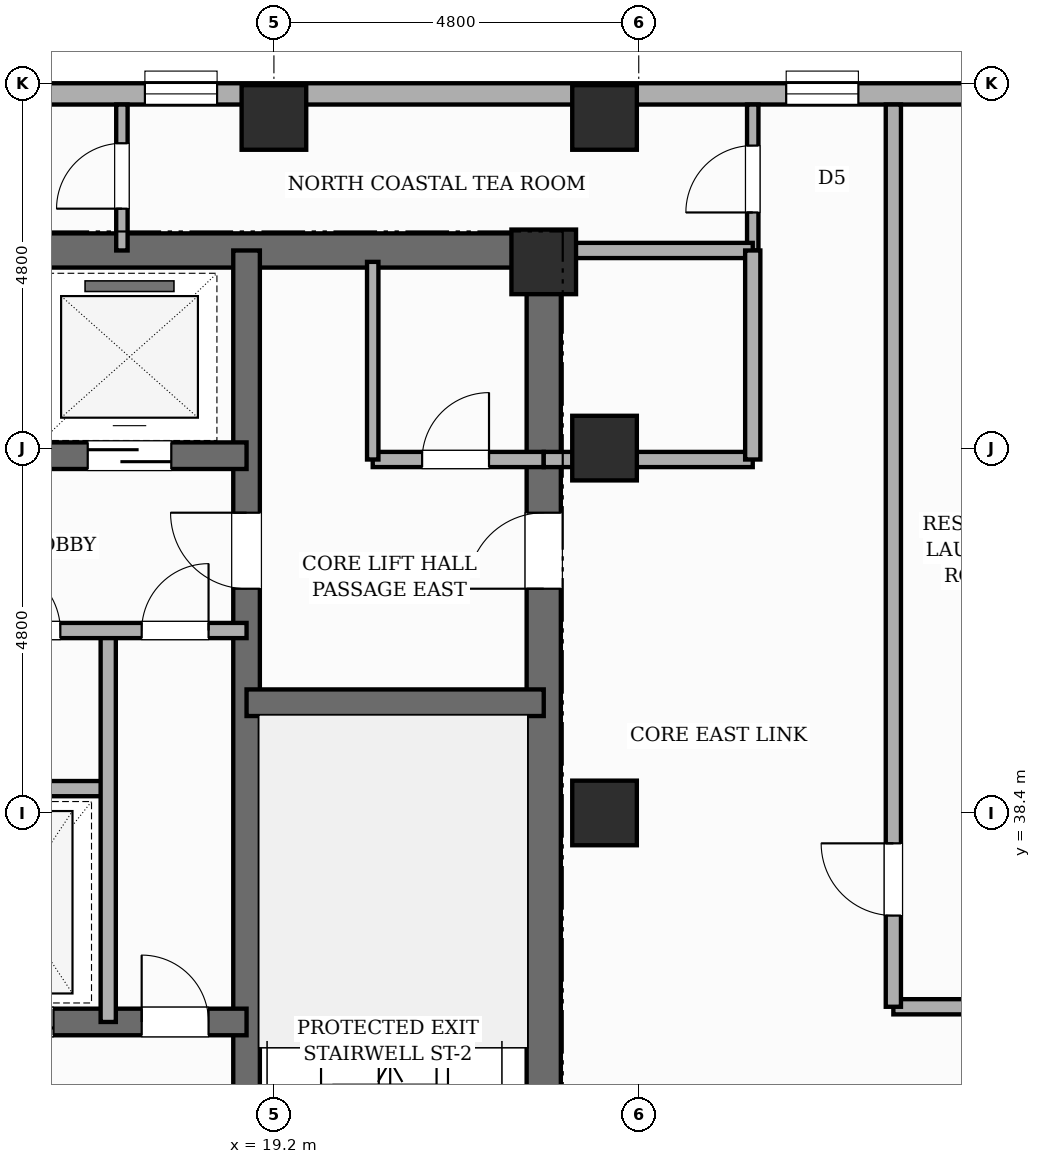
"""IFC4 building model, lengths in metres.
Left out: names, types, materials, properties, quantities, classifications, styles, units other than length and angle.
Written with IfcOpenShell. Run it as: python <this file> out.ifc"""

import sys

from ifc_helpers import new_model, si_unit, direction, frame, frame_2d, origin, origin_2d, place, context, subcontext, project, spatial, rectangle, extrude, element, fill, save


model = new_model("IFC4")
c1 = context("Model", 3, precision=1e-05, world=origin(), true_north=direction((0.0, 1.0)))
c2 = subcontext(c1, "Body", "Model", "MODEL_VIEW")
j1 = project(units=[si_unit("LENGTHUNIT", "METRE"), si_unit("PLANEANGLEUNIT", "RADIAN")], contexts=[c1])
p1 = place(None, origin())
s1 = spatial("IfcSite", under=j1, at=p1, CompositionType="ELEMENT")
p2 = place(p1, origin())
s2 = spatial("IfcBuilding", under=s1, at=p2, CompositionType="ELEMENT")
p3 = place(p2, frame((0.0, 0.0, 211.0)))
s3 = spatial("IfcBuildingStorey", under=s2, at=p3, CompositionType="ELEMENT", Elevation=211.0)
p4 = place(p3, frame((22.75, 30.675, 0.0), z_axis=(0.0, 0.0, 1.0), x_axis=(0.0, 1.0, 0.0)))
e1 = element("IfcWall", 1, at=p4, inside=s3, PredefinedType="SHEAR", context=c2, shape_type="SweptSolid", body=[
    extrude(rectangle(XDim=15.35, YDim=0.45, at=frame_2d((7.675, 0.0))), origin(), (0.0, 0.0, 1.0), 3.6),
])
p5 = place(p4, frame((10.675, 0.0, 0.0)))
e2 = element("IfcOpeningElement", 2, at=p5, cuts=e1, PredefinedType="OPENING", context=c2, shape_type="SweptSolid", body=[
    extrude(rectangle(XDim=1.0, YDim=2.15, at=frame_2d((0.5, 1.075))), frame((0.0, 0.235, 0.0), z_axis=(0.0, -1.0, 0.0), x_axis=(1.0, 0.0, 0.0)), (0.0, 0.0, 1.0), 0.47),
])
p6 = place(p3, frame((6.05, 45.8, 0.0), z_axis=(0.0, 0.0, 1.0), x_axis=(1.0, 0.0, 0.0)))
e3 = element("IfcWall", 3, at=p6, inside=s3, PredefinedType="SHEAR", context=c2, shape_type="SweptSolid", body=[
    extrude(rectangle(XDim=16.7, YDim=0.45, at=frame_2d((8.35, 0.0))), origin(), (0.0, 0.0, 1.0), 3.6),
])
p7 = place(p3, frame((18.84, 30.9, 0.0), z_axis=(0.0, 0.0, 1.0), x_axis=(0.0, 1.0, 0.0)))
e4 = element("IfcWall", 4, at=p7, inside=s3, PredefinedType="SHEAR", context=c2, shape_type="SweptSolid", body=[
    extrude(rectangle(XDim=14.9, YDim=0.35, at=frame_2d((7.45, 0.0))), origin(), (0.0, 0.0, 1.0), 3.6),
])
p8 = place(p7, frame((0.65, 0.0, 0.0)))
e5 = element("IfcOpeningElement", 5, at=p8, cuts=e4, PredefinedType="OPENING", context=c2, shape_type="SweptSolid", body=[
    extrude(rectangle(XDim=0.95, YDim=2.1, at=frame_2d((0.475, 1.05))), frame((0.0, 0.185, 0.0), z_axis=(0.0, -1.0, 0.0), x_axis=(1.0, 0.0, 0.0)), (0.0, 0.0, 1.0), 0.37),
])
p9 = place(p7, frame((10.45, 0.0, 0.0)))
e6 = element("IfcOpeningElement", 6, at=p9, cuts=e4, PredefinedType="OPENING", context=c2, shape_type="SweptSolid", body=[
    extrude(rectangle(XDim=1.0, YDim=2.15, at=frame_2d((0.5, 1.075))), frame((0.0, 0.185, 0.0), z_axis=(0.0, -1.0, 0.0), x_axis=(1.0, 0.0, 0.0)), (0.0, 0.0, 1.0), 0.37),
])
p10 = place(p3, frame((18.84, 39.85, 0.0), z_axis=(0.0, 0.0, 1.0), x_axis=(1.0, 0.0, 0.0)))
e7 = element("IfcWall", 7, at=p10, inside=s3, PredefinedType="SHEAR", context=c2, shape_type="SweptSolid", body=[
    extrude(rectangle(XDim=3.91, YDim=0.35, at=frame_2d((1.955, 0.0))), origin(), (0.0, 0.0, 1.0), 3.6),
])
p11 = place(p3, frame((9.96, 35.65, 0.0), z_axis=(0.0, 0.0, 1.0), x_axis=(1.0, 0.0, 0.0)))
e8 = element("IfcWall", 8, at=p11, inside=s3, PredefinedType="SHEAR", context=c2, shape_type="SweptSolid", body=[
    extrude(rectangle(XDim=8.88, YDim=0.35, at=frame_2d((4.44, 0.0))), origin(), (0.0, 0.0, 1.0), 3.6),
])
p12 = place(p11, frame((0.84, 0.0, 0.0)))
e9 = element("IfcOpeningElement", 9, at=p12, cuts=e8, PredefinedType="OPENING", context=c2, shape_type="SweptSolid", body=[
    extrude(rectangle(XDim=1.1, YDim=2.15, at=frame_2d((0.55, 1.075))), frame((0.0, 0.185, 0.0), z_axis=(0.0, -1.0, 0.0), x_axis=(1.0, 0.0, 0.0)), (0.0, 0.0, 1.0), 0.37),
])
p13 = place(p11, frame((5.24, 0.0, 0.0)))
e10 = element("IfcOpeningElement", 10, at=p13, cuts=e8, PredefinedType="OPENING", context=c2, shape_type="SweptSolid", body=[
    extrude(rectangle(XDim=1.1, YDim=2.15, at=frame_2d((0.55, 1.075))), frame((0.0, 0.185, 0.0), z_axis=(0.0, -1.0, 0.0), x_axis=(1.0, 0.0, 0.0)), (0.0, 0.0, 1.0), 0.37),
])
p14 = place(p11, frame((7.5, 0.0, 0.0)))
e11 = element("IfcOpeningElement", 11, at=p14, cuts=e8, PredefinedType="OPENING", context=c2, shape_type="SweptSolid", body=[
    extrude(rectangle(XDim=0.88, YDim=2.1, at=frame_2d((0.44, 1.05))), frame((0.0, 0.185, 0.0), z_axis=(0.0, -1.0, 0.0), x_axis=(1.0, 0.0, 0.0)), (0.0, 0.0, 1.0), 0.37),
])
p15 = place(p3, frame((9.96, 43.1, 0.0), z_axis=(0.0, 0.0, 1.0), x_axis=(1.0, 0.0, 0.0)))
e12 = element("IfcWall", 12, at=p15, inside=s3, PredefinedType="SHEAR", context=c2, shape_type="SweptSolid", body=[
    extrude(rectangle(XDim=8.88, YDim=0.35, at=frame_2d((4.44, 0.0))), origin(), (0.0, 0.0, 1.0), 3.6),
])
p16 = place(p15, frame((0.99, 0.0, 0.0)))
e13 = element("IfcOpeningElement", 13, at=p16, cuts=e12, PredefinedType="OPENING", context=c2, shape_type="SweptSolid", body=[
    extrude(rectangle(XDim=1.1, YDim=2.15, at=frame_2d((0.55, 1.075))), frame((0.0, 0.185, 0.0), z_axis=(0.0, -1.0, 0.0), x_axis=(1.0, 0.0, 0.0)), (0.0, 0.0, 1.0), 0.37),
])
p17 = place(p15, frame((3.89, 0.0, 0.0)))
e14 = element("IfcOpeningElement", 14, at=p17, cuts=e12, PredefinedType="OPENING", context=c2, shape_type="SweptSolid", body=[
    extrude(rectangle(XDim=1.1, YDim=2.15, at=frame_2d((0.55, 1.075))), frame((0.0, 0.185, 0.0), z_axis=(0.0, -1.0, 0.0), x_axis=(1.0, 0.0, 0.0)), (0.0, 0.0, 1.0), 0.37),
])
p18 = place(p15, frame((6.79, 0.0, 0.0)))
e15 = element("IfcOpeningElement", 15, at=p18, cuts=e12, PredefinedType="OPENING", context=c2, shape_type="SweptSolid", body=[
    extrude(rectangle(XDim=1.1, YDim=2.15, at=frame_2d((0.55, 1.075))), frame((0.0, 0.185, 0.0), z_axis=(0.0, -1.0, 0.0), x_axis=(1.0, 0.0, 0.0)), (0.0, 0.0, 1.0), 0.37),
])
for number, where, z_axis, x_axis in (
    (16, (19.2, 47.55, 0.0), (0.0, 0.0, 1.0), (1.0, 0.0, 0.0)),
    (17, (22.75, 45.65, 0.0), (0.0, 0.0, 1.0), (1.0, 0.0, 0.0)),
    (18, (23.55, 38.4, 0.0), (0.0, 0.0, 1.0), (1.0, 0.0, 0.0)),
    (19, (23.55, 43.2, 0.0), (0.0, 0.0, 1.0), (1.0, 0.0, 0.0)),
    (20, (23.55, 47.55, 0.0), (0.0, 0.0, 1.0), (1.0, 0.0, 0.0)),
):
    element("IfcColumn", number, at=place(p3, frame(where, z_axis=z_axis, x_axis=x_axis)), inside=s3, PredefinedType="COLUMN", context=c2, shape_type="SweptSolid", body=[
        extrude(rectangle(XDim=0.85, YDim=0.85, at=origin_2d()), origin(), (0.0, 0.0, 1.0), 3.6),
    ])
p19 = place(p3, frame((7.2, 47.86, 0.0), z_axis=(0.0, 0.0, 1.0), x_axis=(1.0, 0.0, 0.0)))
e21 = element("IfcWall", 21, at=p19, inside=s3, PredefinedType="STANDARD", context=c2, shape_type="SweptSolid", body=[
    extrude(rectangle(XDim=43.2, YDim=0.28, at=frame_2d((21.6, 0.0))), origin(), (0.0, 0.0, 1.0), 2.66),
])
p20 = place(p19, frame((28.866, 0.0, 0.65)))
e22 = element("IfcOpeningElement", 22, at=p20, cuts=e21, PredefinedType="OPENING", context=c2, shape_type="SweptSolid", body=[
    extrude(rectangle(XDim=1.4, YDim=1.1, at=frame_2d((0.7, 0.55))), frame((0.0, 0.15, 0.0), z_axis=(0.0, -1.0, 0.0), x_axis=(1.0, 0.0, 0.0)), (0.0, 0.0, 1.0), 0.3),
])
p21 = place(p19, frame((41.49, 0.0, 0.65)))
e23 = element("IfcOpeningElement", 23, at=p21, cuts=e21, PredefinedType="OPENING", context=c2, shape_type="SweptSolid", body=[
    extrude(rectangle(XDim=1.4, YDim=1.1, at=frame_2d((0.7, 0.55))), frame((0.0, 0.15, 0.0), z_axis=(0.0, -1.0, 0.0), x_axis=(1.0, 0.0, 0.0)), (0.0, 0.0, 1.0), 0.3),
])
p22 = place(p19, frame((18.74, 0.0, 0.45)))
e24 = element("IfcOpeningElement", 24, at=p22, cuts=e21, PredefinedType="OPENING", context=c2, shape_type="SweptSolid", body=[
    extrude(rectangle(XDim=0.95, YDim=1.8, at=frame_2d((0.475, 0.9))), frame((0.0, 0.15, 0.0), z_axis=(0.0, -1.0, 0.0), x_axis=(1.0, 0.0, 0.0)), (0.0, 0.0, 1.0), 0.3),
])
p23 = place(p19, frame((37.887, 0.0, 0.65)))
e25 = element("IfcOpeningElement", 25, at=p23, cuts=e21, PredefinedType="OPENING", context=c2, shape_type="SweptSolid", body=[
    extrude(rectangle(XDim=1.4, YDim=1.1, at=frame_2d((0.7, 0.55))), frame((0.0, 0.15, 0.0), z_axis=(0.0, -1.0, 0.0), x_axis=(1.0, 0.0, 0.0)), (0.0, 0.0, 1.0), 0.3),
])
p24 = place(p19, frame((0.308, 0.0, 0.65)))
e26 = element("IfcOpeningElement", 26, at=p24, cuts=e21, PredefinedType="OPENING", context=c2, shape_type="SweptSolid", body=[
    extrude(rectangle(XDim=1.4, YDim=1.1, at=frame_2d((0.7, 0.55))), frame((0.0, 0.15, 0.0), z_axis=(0.0, -1.0, 0.0), x_axis=(1.0, 0.0, 0.0)), (0.0, 0.0, 1.0), 0.3),
])
p25 = place(p19, frame((10.302, 0.0, 0.45)))
e27 = element("IfcOpeningElement", 27, at=p25, cuts=e21, PredefinedType="OPENING", context=c2, shape_type="SweptSolid", body=[
    extrude(rectangle(XDim=0.95, YDim=1.8, at=frame_2d((0.475, 0.9))), frame((0.0, 0.15, 0.0), z_axis=(0.0, -1.0, 0.0), x_axis=(1.0, 0.0, 0.0)), (0.0, 0.0, 1.0), 0.3),
])
p26 = place(p19, frame((23.492, 0.0, 0.65)))
e28 = element("IfcOpeningElement", 28, at=p26, cuts=e21, PredefinedType="OPENING", context=c2, shape_type="SweptSolid", body=[
    extrude(rectangle(XDim=1.4, YDim=1.1, at=frame_2d((0.7, 0.55))), frame((0.0, 0.15, 0.0), z_axis=(0.0, -1.0, 0.0), x_axis=(1.0, 0.0, 0.0)), (0.0, 0.0, 1.0), 0.3),
])
p27 = place(p3, frame((9.96, 38.72, 0.0), z_axis=(0.0, 0.0, 1.0), x_axis=(1.0, 0.0, 0.0)))
e29 = element("IfcWall", 29, at=p27, inside=s3, PredefinedType="POLYGONAL", context=c2, shape_type="SweptSolid", body=[
    extrude(rectangle(XDim=7.06, YDim=0.2, at=frame_2d((3.53, 0.0))), origin(), (0.0, 0.0, 1.0), 3.38),
])
p28 = place(p3, frame((17.02, 35.65, 0.0), z_axis=(0.0, 0.0, 1.0), x_axis=(0.0, 1.0, 0.0)))
e30 = element("IfcWall", 30, at=p28, inside=s3, PredefinedType="POLYGONAL", context=c2, shape_type="SweptSolid", body=[
    extrude(rectangle(XDim=5.15, YDim=0.2, at=frame_2d((2.575, 0.0))), origin(), (0.0, 0.0, 1.0), 3.38),
])
p29 = place(p3, frame((9.96, 40.8, 0.0), z_axis=(0.0, 0.0, 1.0), x_axis=(1.0, 0.0, 0.0)))
e31 = element("IfcWall", 31, at=p29, inside=s3, PredefinedType="POLYGONAL", context=c2, shape_type="SweptSolid", body=[
    extrude(rectangle(XDim=8.88, YDim=0.2, at=frame_2d((4.44, 0.0))), origin(), (0.0, 0.0, 1.0), 3.38),
])
p30 = place(p29, frame((7.5, 0.0, 0.0)))
e32 = element("IfcOpeningElement", 32, at=p30, cuts=e31, PredefinedType="OPENING", context=c2, shape_type="SweptSolid", body=[
    extrude(rectangle(XDim=0.88, YDim=2.1, at=frame_2d((0.44, 1.05))), frame((0.0, 0.11, 0.0), z_axis=(0.0, -1.0, 0.0), x_axis=(1.0, 0.0, 0.0)), (0.0, 0.0, 1.0), 0.22),
])
p31 = place(p29, frame((1.0, 0.0, 0.0)))
e33 = element("IfcOpeningElement", 33, at=p31, cuts=e31, PredefinedType="OPENING", context=c2, shape_type="SweptSolid", body=[
    extrude(rectangle(XDim=0.88, YDim=2.1, at=frame_2d((0.44, 1.05))), frame((0.0, 0.11, 0.0), z_axis=(0.0, -1.0, 0.0), x_axis=(1.0, 0.0, 0.0)), (0.0, 0.0, 1.0), 0.22),
])
p32 = place(p29, frame((3.4, 0.0, 0.0)))
e34 = element("IfcOpeningElement", 34, at=p32, cuts=e31, PredefinedType="OPENING", context=c2, shape_type="SweptSolid", body=[
    extrude(rectangle(XDim=0.88, YDim=2.1, at=frame_2d((0.44, 1.05))), frame((0.0, 0.11, 0.0), z_axis=(0.0, -1.0, 0.0), x_axis=(1.0, 0.0, 0.0)), (0.0, 0.0, 1.0), 0.22),
])
p33 = place(p29, frame((5.55, 0.0, 0.0)))
e35 = element("IfcOpeningElement", 35, at=p33, cuts=e31, PredefinedType="OPENING", context=c2, shape_type="SweptSolid", body=[
    extrude(rectangle(XDim=0.88, YDim=2.1, at=frame_2d((0.44, 1.05))), frame((0.0, 0.11, 0.0), z_axis=(0.0, -1.0, 0.0), x_axis=(1.0, 0.0, 0.0)), (0.0, 0.0, 1.0), 0.22),
])
p34 = place(p3, frame((20.5, 43.05, 0.0), z_axis=(0.0, 0.0, 1.0), x_axis=(1.0, 0.0, 0.0)))
e36 = element("IfcWall", 36, at=p34, inside=s3, PredefinedType="POLYGONAL", context=c2, shape_type="SweptSolid", body=[
    extrude(rectangle(XDim=2.25, YDim=0.2, at=frame_2d((1.125, 0.0))), origin(), (0.0, 0.0, 1.0), 2.66),
])
p35 = place(p34, frame((0.65, 0.0, 0.0)))
e37 = element("IfcOpeningElement", 37, at=p35, cuts=e36, PredefinedType="OPENING", context=c2, shape_type="SweptSolid", body=[
    extrude(rectangle(XDim=0.88, YDim=2.1, at=frame_2d((0.44, 1.05))), frame((0.0, 0.11, 0.0), z_axis=(0.0, -1.0, 0.0), x_axis=(1.0, 0.0, 0.0)), (0.0, 0.0, 1.0), 0.22),
])
p36 = place(p3, frame((20.5, 43.05, 0.0), z_axis=(0.0, 0.0, 1.0), x_axis=(0.0, 1.0, 0.0)))
e38 = element("IfcWall", 38, at=p36, inside=s3, PredefinedType="PARTITIONING", context=c2, shape_type="SweptSolid", body=[
    extrude(rectangle(XDim=2.6, YDim=0.15, at=frame_2d((1.3, 0.0))), origin(), (0.0, 0.0, 1.0), 3.38),
])
p37 = place(p3, frame((25.5, 45.8, 0.0), z_axis=(0.0, 0.0, 1.0), x_axis=(0.0, 1.0, 0.0)))
e39 = element("IfcWall", 39, at=p37, inside=s3, PredefinedType="PARTITIONING", context=c2, shape_type="SweptSolid", body=[
    extrude(rectangle(XDim=1.92, YDim=0.15, at=frame_2d((0.96, 0.0))), origin(), (0.0, 0.0, 1.0), 3.38),
])
p38 = place(p37, frame((0.5, 0.0, 0.0)))
e40 = element("IfcOpeningElement", 40, at=p38, cuts=e39, PredefinedType="OPENING", context=c2, shape_type="SweptSolid", body=[
    extrude(rectangle(XDim=0.88, YDim=2.1, at=frame_2d((0.44, 1.05))), frame((0.0, 0.085, 0.0), z_axis=(0.0, -1.0, 0.0), x_axis=(1.0, 0.0, 0.0)), (0.0, 0.0, 1.0), 0.17),
])
p39 = place(p3, frame((22.75, 45.8, 0.0), z_axis=(0.0, 0.0, 1.0), x_axis=(1.0, 0.0, 0.0)))
e41 = element("IfcWall", 41, at=p39, inside=s3, PredefinedType="PARTITIONING", context=c2, shape_type="SweptSolid", body=[
    extrude(rectangle(XDim=2.75, YDim=0.2, at=frame_2d((1.375, 0.0))), origin(), (0.0, 0.0, 1.0), 3.38),
])
p40 = place(p3, frame((17.2, 45.8, 0.0), z_axis=(0.0, 0.0, 1.0), x_axis=(0.0, 1.0, 0.0)))
e42 = element("IfcWall", 42, at=p40, inside=s3, PredefinedType="PARTITIONING", context=c2, shape_type="SweptSolid", body=[
    extrude(rectangle(XDim=1.92, YDim=0.15, at=frame_2d((0.96, 0.0))), origin(), (0.0, 0.0, 1.0), 3.38),
])
p41 = place(p40, frame((0.55, 0.0, 0.0)))
e43 = element("IfcOpeningElement", 43, at=p41, cuts=e42, PredefinedType="OPENING", context=c2, shape_type="SweptSolid", body=[
    extrude(rectangle(XDim=0.86, YDim=2.1, at=frame_2d((0.43, 1.05))), frame((0.0, 0.085, 0.0), z_axis=(0.0, -1.0, 0.0), x_axis=(1.0, 0.0, 0.0)), (0.0, 0.0, 1.0), 0.17),
])
p42 = place(p3, frame((27.35, 35.85, 0.0), z_axis=(0.0, 0.0, 1.0), x_axis=(1.0, 0.0, 0.0)))
e44 = element("IfcWall", 44, at=p42, inside=s3, PredefinedType="PARTITIONING", context=c2, shape_type="SweptSolid", body=[
    extrude(rectangle(XDim=14.43, YDim=0.2, at=frame_2d((7.215, 0.0))), origin(), (0.0, 0.0, 1.0), 3.38),
])
p43 = place(p42, frame((4.803, 0.0, 0.0)))
e45 = element("IfcOpeningElement", 45, at=p43, cuts=e44, PredefinedType="OPENING", context=c2, shape_type="SweptSolid", body=[
    extrude(rectangle(XDim=0.98, YDim=2.18, at=frame_2d((0.49, 1.09))), frame((0.0, 0.11, 0.0), z_axis=(0.0, -1.0, 0.0), x_axis=(1.0, 0.0, 0.0)), (0.0, 0.0, 1.0), 0.22),
])
p44 = place(p3, frame((27.35, 35.85, 0.0), z_axis=(0.0, 0.0, 1.0), x_axis=(0.0, 1.0, 0.0)))
e46 = element("IfcWall", 46, at=p44, inside=s3, PredefinedType="PARTITIONING", context=c2, shape_type="SweptSolid", body=[
    extrude(rectangle(XDim=11.87, YDim=0.2, at=frame_2d((5.935, 0.0))), origin(), (0.0, 0.0, 1.0), 3.38),
])
p45 = place(p44, frame((1.2, 0.0, 0.0)))
e47 = element("IfcOpeningElement", 47, at=p45, cuts=e46, PredefinedType="OPENING", context=c2, shape_type="SweptSolid", body=[
    extrude(rectangle(XDim=0.95, YDim=2.15, at=frame_2d((0.475, 1.075))), frame((0.0, 0.11, 0.0), z_axis=(0.0, -1.0, 0.0), x_axis=(1.0, 0.0, 0.0)), (0.0, 0.0, 1.0), 0.22),
])
p46 = place(p3, frame((22.75, 43.05, 0.0), z_axis=(0.0, 0.0, 1.0), x_axis=(1.0, 0.0, 0.0)))
e48 = element("IfcWall", 48, at=p46, inside=s3, PredefinedType="PARTITIONING", context=c2, shape_type="SweptSolid", body=[
    extrude(rectangle(XDim=2.75, YDim=0.2, at=frame_2d((1.375, 0.0))), origin(), (0.0, 0.0, 1.0), 2.66),
])
p47 = place(p3, frame((25.5, 43.05, 0.0), z_axis=(0.0, 0.0, 1.0), x_axis=(0.0, 1.0, 0.0)))
e49 = element("IfcWall", 49, at=p47, inside=s3, PredefinedType="PARTITIONING", context=c2, shape_type="SweptSolid", body=[
    extrude(rectangle(XDim=2.75, YDim=0.2, at=frame_2d((1.375, 0.0))), origin(), (0.0, 0.0, 1.0), 3.38),
])
p48 = place(p22, origin())
e50 = element("IfcWindow", 50, at=p48, inside=s3, PartitioningType="SINGLE_PANEL", PredefinedType="WINDOW", context=c2, shape_type="SweptSolid", body=[
    extrude(rectangle(XDim=0.95, YDim=1.8, at=frame_2d((0.475, 0.9))), frame((0.0, 0.03, 0.0), z_axis=(0.0, -1.0, 0.0), x_axis=(1.0, 0.0, 0.0)), (0.0, 0.0, 1.0), 0.06),
])
fill(e24, e50)
p49 = place(p25, origin())
e51 = element("IfcWindow", 51, at=p49, inside=s3, PartitioningType="SINGLE_PANEL", PredefinedType="WINDOW", context=c2, shape_type="SweptSolid", body=[
    extrude(rectangle(XDim=0.95, YDim=1.8, at=frame_2d((0.475, 0.9))), frame((0.0, 0.03, 0.0), z_axis=(0.0, -1.0, 0.0), x_axis=(1.0, 0.0, 0.0)), (0.0, 0.0, 1.0), 0.06),
])
fill(e27, e51)
p50 = place(p13, origin())
e52 = element("IfcDoor", 52, at=p50, inside=s3, OperationType="SLIDING_TO_RIGHT", PredefinedType="DOOR", context=c2, shape_type="SweptSolid", body=[
    extrude(rectangle(XDim=1.1, YDim=2.15, at=frame_2d((0.55, 1.075))), frame((0.0, 0.025, 0.0), z_axis=(0.0, -1.0, 0.0), x_axis=(1.0, 0.0, 0.0)), (0.0, 0.0, 1.0), 0.05),
])
fill(e10, e52)
p51 = place(p14, origin())
e53 = element("IfcDoor", 53, at=p51, inside=s3, OperationType="SINGLE_SWING_LEFT", PredefinedType="DOOR", context=c2, shape_type="SweptSolid", body=[
    extrude(rectangle(XDim=0.88, YDim=2.1, at=frame_2d((0.44, 1.05))), frame((0.0, 0.025, 0.0), z_axis=(0.0, -1.0, 0.0), x_axis=(1.0, 0.0, 0.0)), (0.0, 0.0, 1.0), 0.05),
])
fill(e11, e53)
p52 = place(p30, origin())
e54 = element("IfcDoor", 54, at=p52, inside=s3, OperationType="SINGLE_SWING_RIGHT", PredefinedType="DOOR", context=c2, shape_type="SweptSolid", body=[
    extrude(rectangle(XDim=0.88, YDim=2.1, at=frame_2d((0.44, 1.05))), frame((0.0, 0.025, 0.0), z_axis=(0.0, -1.0, 0.0), x_axis=(1.0, 0.0, 0.0)), (0.0, 0.0, 1.0), 0.05),
])
fill(e32, e54)
p53 = place(p18, origin())
e55 = element("IfcDoor", 55, at=p53, inside=s3, OperationType="SLIDING_TO_LEFT", PredefinedType="DOOR", context=c2, shape_type="SweptSolid", body=[
    extrude(rectangle(XDim=1.1, YDim=2.15, at=frame_2d((0.55, 1.075))), frame((0.0, 0.025, 0.0), z_axis=(0.0, -1.0, 0.0), x_axis=(1.0, 0.0, 0.0)), (0.0, 0.0, 1.0), 0.05),
])
fill(e15, e55)
p54 = place(p9, origin())
e56 = element("IfcDoor", 56, at=p54, inside=s3, OperationType="SINGLE_SWING_RIGHT", PredefinedType="DOOR", context=c2, shape_type="SweptSolid", body=[
    extrude(rectangle(XDim=1.0, YDim=2.15, at=frame_2d((0.5, 1.075))), frame((0.0, 0.025, 0.0), z_axis=(0.0, -1.0, 0.0), x_axis=(1.0, 0.0, 0.0)), (0.0, 0.0, 1.0), 0.05),
])
fill(e6, e56)
p55 = place(p5, origin())
e57 = element("IfcDoor", 57, at=p55, inside=s3, OperationType="SINGLE_SWING_LEFT", PredefinedType="DOOR", context=c2, shape_type="SweptSolid", body=[
    extrude(rectangle(XDim=1.0, YDim=2.15, at=frame_2d((0.5, 1.075))), frame((0.0, 0.025, 0.0), z_axis=(0.0, -1.0, 0.0), x_axis=(1.0, 0.0, 0.0)), (0.0, 0.0, 1.0), 0.05),
])
fill(e2, e57)
p56 = place(p33, origin())
e58 = element("IfcDoor", 58, at=p56, inside=s3, OperationType="SINGLE_SWING_LEFT", PredefinedType="DOOR", context=c2, shape_type="SweptSolid", body=[
    extrude(rectangle(XDim=0.88, YDim=2.1, at=frame_2d((0.44, 1.05))), frame((0.0, 0.025, 0.0), z_axis=(0.0, -1.0, 0.0), x_axis=(1.0, 0.0, 0.0)), (0.0, 0.0, 1.0), 0.05),
])
fill(e35, e58)
p57 = place(p35, origin())
e59 = element("IfcDoor", 59, at=p57, inside=s3, OperationType="SINGLE_SWING_RIGHT", PredefinedType="DOOR", context=c2, shape_type="SweptSolid", body=[
    extrude(rectangle(XDim=0.88, YDim=2.1, at=frame_2d((0.44, 1.05))), frame((0.0, 0.025, 0.0), z_axis=(0.0, -1.0, 0.0), x_axis=(1.0, 0.0, 0.0)), (0.0, 0.0, 1.0), 0.05),
])
fill(e37, e59)
p58 = place(p38, origin())
e60 = element("IfcDoor", 60, at=p58, inside=s3, OperationType="SINGLE_SWING_LEFT", PredefinedType="DOOR", context=c2, shape_type="SweptSolid", body=[
    extrude(rectangle(XDim=0.88, YDim=2.1, at=frame_2d((0.44, 1.05))), frame((0.0, 0.025, 0.0), z_axis=(0.0, -1.0, 0.0), x_axis=(1.0, 0.0, 0.0)), (0.0, 0.0, 1.0), 0.05),
])
fill(e40, e60)
p59 = place(p41, origin())
e61 = element("IfcDoor", 61, at=p59, inside=s3, OperationType="SINGLE_SWING_LEFT", PredefinedType="DOOR", context=c2, shape_type="SweptSolid", body=[
    extrude(rectangle(XDim=0.86, YDim=2.1, at=frame_2d((0.43, 1.05))), frame((0.0, 0.025, 0.0), z_axis=(0.0, -1.0, 0.0), x_axis=(1.0, 0.0, 0.0)), (0.0, 0.0, 1.0), 0.05),
])
fill(e43, e61)
p60 = place(p45, origin())
e62 = element("IfcDoor", 62, at=p60, inside=s3, OperationType="SINGLE_SWING_RIGHT", PredefinedType="DOOR", context=c2, shape_type="SweptSolid", body=[
    extrude(rectangle(XDim=0.95, YDim=2.15, at=frame_2d((0.475, 1.075))), frame((0.0, 0.025, 0.0), z_axis=(0.0, -1.0, 0.0), x_axis=(1.0, 0.0, 0.0)), (0.0, 0.0, 1.0), 0.05),
])
fill(e47, e62)
save(model, sys.argv[1])
